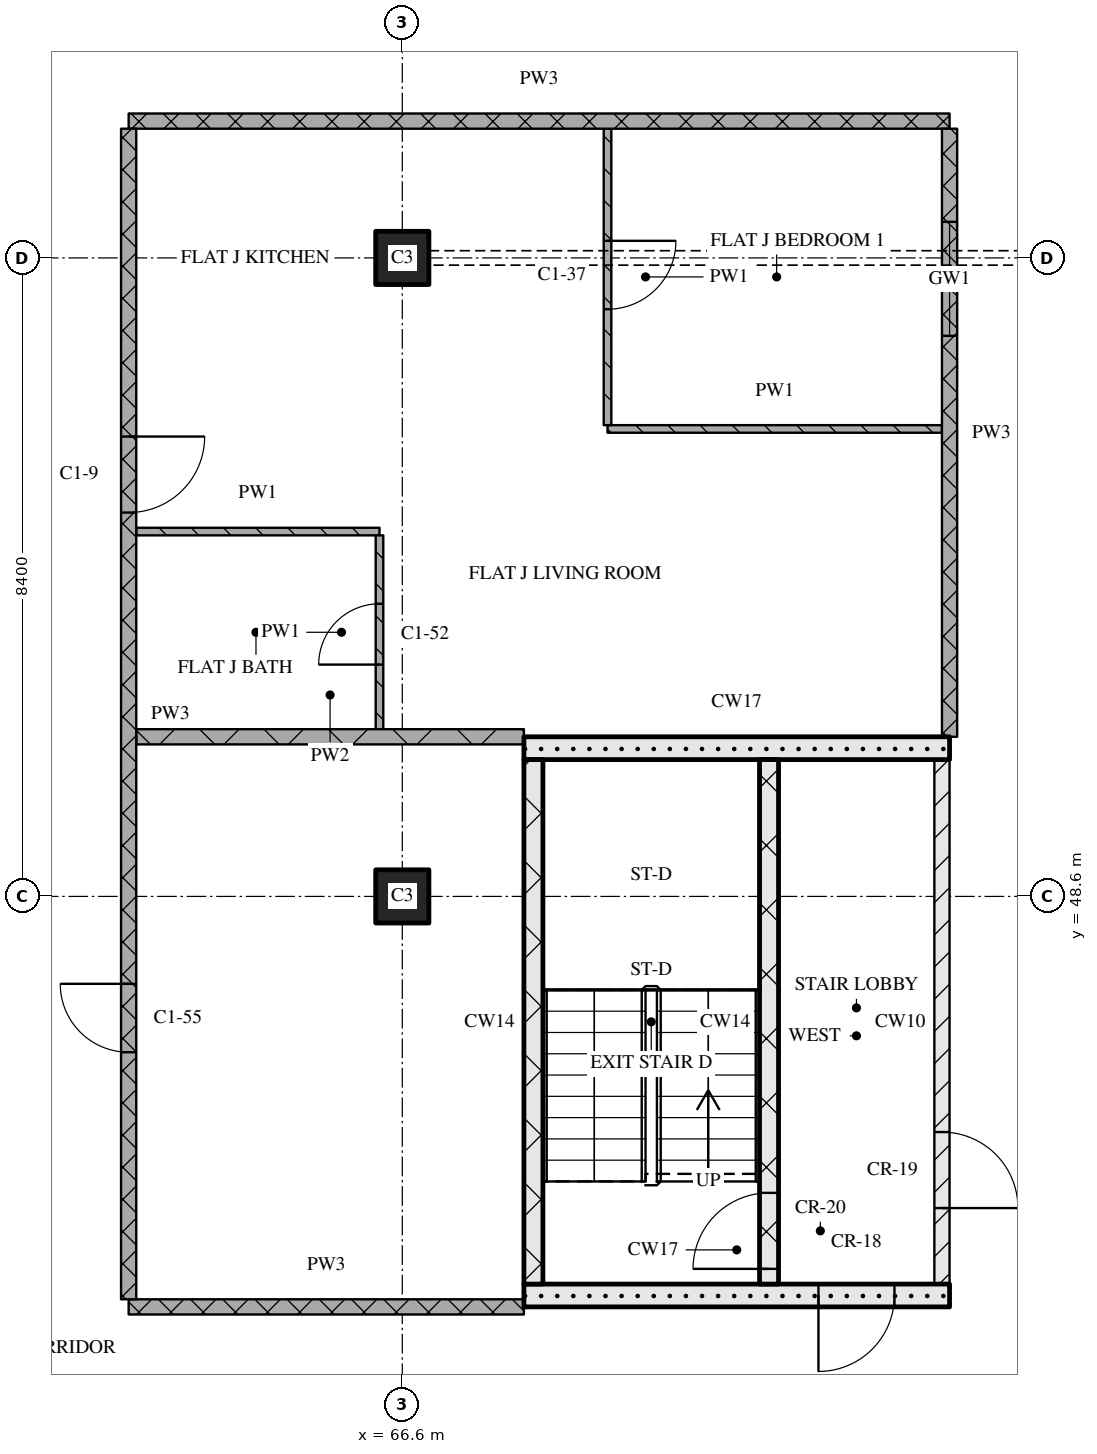
"""IFC4 building model, lengths in metres.
Left out: names, types, materials, properties, quantities, classifications, styles, units other than length and angle.
Written with IfcOpenShell. Run it as: python <this file> out.ifc"""

import sys

from ifc_helpers import new_model, si_unit, direction, frame, frame_2d, origin, origin_2d, place, context, subcontext, project, spatial, rectangle, extrude, element, fill, save


model = new_model("IFC4")
c1 = context("Model", 3, precision=1e-05, world=origin(), true_north=direction((0.0, 1.0)))
c2 = subcontext(c1, "Body", "Model", "MODEL_VIEW")
j1 = project(units=[si_unit("LENGTHUNIT", "METRE"), si_unit("PLANEANGLEUNIT", "RADIAN")], contexts=[c1])
p1 = place(None, origin())
s1 = spatial("IfcSite", under=j1, at=p1, CompositionType="ELEMENT")
p2 = place(p1, origin())
s2 = spatial("IfcBuilding", under=s1, at=p2, CompositionType="ELEMENT")
p3 = place(p2, frame((0.0, 0.0, 151.05)))
s3 = spatial("IfcBuildingStorey", under=s2, at=p3, CompositionType="ELEMENT", Elevation=151.05)
for number, where, z_axis, x_axis in (
    (1, (66.6, 48.6, 0.0), (0.0, 0.0, 1.0), (1.0, 0.0, 0.0)),
    (2, (66.6, 57.0, 0.0), (0.0, 0.0, 1.0), (1.0, 0.0, 0.0)),
):
    element("IfcColumn", number, at=place(p3, frame(where, z_axis=z_axis, x_axis=x_axis)), inside=s3, PredefinedType="COLUMN", context=c2, shape_type="SweptSolid", body=[
        extrude(rectangle(XDim=0.7, YDim=0.7, at=origin_2d()), origin(), (0.0, 0.0, 1.0), 3.6),
    ])
p4 = place(p3, frame((68.2, 43.35, 0.0), z_axis=(0.0, 0.0, 1.0), x_axis=(1.0, 0.0, 0.0)))
e3 = element("IfcWall", 3, at=p4, inside=s3, PredefinedType="SOLIDWALL", context=c2, shape_type="SweptSolid", body=[
    extrude(rectangle(XDim=5.6, YDim=0.3, at=frame_2d((2.8, 0.0))), origin(), (0.0, 0.0, 1.0), 3.32),
])
p5 = place(p4, frame((3.875, 0.0, 0.0)))
e4 = element("IfcOpeningElement", 4, at=p5, cuts=e3, PredefinedType="OPENING", context=c2, shape_type="SweptSolid", body=[
    extrude(rectangle(XDim=1.0, YDim=2.1, at=frame_2d((0.5, 1.05))), frame((0.0, 0.16, 0.0), z_axis=(0.0, -1.0, 0.0), x_axis=(1.0, 0.0, 0.0)), (0.0, 0.0, 1.0), 0.32),
])
p6 = place(p3, frame((68.325, 43.5, 0.0), z_axis=(0.0, 0.0, 1.0), x_axis=(0.0, 1.0, 0.0)))
e5 = element("IfcWall", 5, at=p6, inside=s3, PredefinedType="SOLIDWALL", context=c2, shape_type="SweptSolid", body=[
    extrude(rectangle(XDim=6.9, YDim=0.25, at=frame_2d((3.45, 0.0))), origin(), (0.0, 0.0, 1.0), 3.32),
])
p7 = place(p3, frame((71.425, 43.5, 0.0), z_axis=(0.0, 0.0, 1.0), x_axis=(0.0, 1.0, 0.0)))
e6 = element("IfcWall", 6, at=p7, inside=s3, PredefinedType="SOLIDWALL", context=c2, shape_type="SweptSolid", body=[
    extrude(rectangle(XDim=6.9, YDim=0.25, at=frame_2d((3.45, 0.0))), origin(), (0.0, 0.0, 1.0), 3.32),
])
p8 = place(p7, frame((0.2, 0.0, 0.0)))
e7 = element("IfcOpeningElement", 7, at=p8, cuts=e6, PredefinedType="OPENING", context=c2, shape_type="SweptSolid", body=[
    extrude(rectangle(XDim=1.0, YDim=2.1, at=frame_2d((0.5, 1.05))), frame((0.0, 0.135, 0.0), z_axis=(0.0, -1.0, 0.0), x_axis=(1.0, 0.0, 0.0)), (0.0, 0.0, 1.0), 0.27),
])
p9 = place(p3, frame((73.7, 43.5, 0.0), z_axis=(0.0, 0.0, 1.0), x_axis=(0.0, 1.0, 0.0)))
e8 = element("IfcWall", 8, at=p9, inside=s3, PredefinedType="PARTITIONING", context=c2, shape_type="SweptSolid", body=[
    extrude(rectangle(XDim=6.9, YDim=0.2, at=frame_2d((3.45, 0.0))), origin(), (0.0, 0.0, 1.0), 3.32),
])
p10 = place(p9, frame((1.0, 0.0, 0.0)))
e9 = element("IfcOpeningElement", 9, at=p10, cuts=e8, PredefinedType="OPENING", context=c2, shape_type="SweptSolid", body=[
    extrude(rectangle(XDim=1.0, YDim=2.1, at=frame_2d((0.5, 1.05))), frame((0.0, 0.11, 0.0), z_axis=(0.0, -1.0, 0.0), x_axis=(1.0, 0.0, 0.0)), (0.0, 0.0, 1.0), 0.22),
])
p11 = place(p3, frame((68.2, 50.55, 0.0), z_axis=(0.0, 0.0, 1.0), x_axis=(1.0, 0.0, 0.0)))
e10 = element("IfcWall", 10, at=p11, inside=s3, PredefinedType="SOLIDWALL", context=c2, shape_type="SweptSolid", body=[
    extrude(rectangle(XDim=5.6, YDim=0.3, at=frame_2d((2.8, 0.0))), origin(), (0.0, 0.0, 1.0), 3.32),
])
p12 = place(p3, frame((63.0, 43.2, 0.0), z_axis=(0.0, 0.0, 1.0), x_axis=(1.0, 0.0, 0.0)))
e11 = element("IfcWall", 11, at=p12, inside=s3, PredefinedType="PARTITIONING", context=c2, shape_type="SweptSolid", body=[
    extrude(rectangle(XDim=5.2, YDim=0.2, at=frame_2d((2.6, 0.0))), origin(), (0.0, 0.0, 1.0), 3.32),
])
p13 = place(p3, frame((63.1, 50.7, 0.0), z_axis=(0.0, 0.0, 1.0), x_axis=(1.0, 0.0, 0.0)))
e12 = element("IfcWall", 12, at=p13, inside=s3, PredefinedType="PARTITIONING", context=c2, shape_type="SweptSolid", body=[
    extrude(rectangle(XDim=5.1, YDim=0.2, at=frame_2d((2.55, 0.0))), origin(), (0.0, 0.0, 1.0), 3.32),
])
p14 = place(p3, frame((63.1, 53.4, 0.0), z_axis=(0.0, 0.0, 1.0), x_axis=(1.0, 0.0, 0.0)))
e13 = element("IfcWall", 13, at=p14, inside=s3, PredefinedType="PARTITIONING", context=c2, shape_type="SweptSolid", body=[
    extrude(rectangle(XDim=3.2, YDim=0.1, at=frame_2d((1.6, 0.0))), origin(), (0.0, 0.0, 1.0), 3.32),
])
p15 = place(p3, frame((69.3, 54.75, 0.0), z_axis=(0.0, 0.0, 1.0), x_axis=(1.0, 0.0, 0.0)))
e14 = element("IfcWall", 14, at=p15, inside=s3, PredefinedType="PARTITIONING", context=c2, shape_type="SweptSolid", body=[
    extrude(rectangle(XDim=4.4, YDim=0.1, at=frame_2d((2.2, 0.0))), origin(), (0.0, 0.0, 1.0), 3.32),
])
p16 = place(p3, frame((63.0, 58.8, 0.0), z_axis=(0.0, 0.0, 1.0), x_axis=(1.0, 0.0, 0.0)))
e15 = element("IfcWall", 15, at=p16, inside=s3, PredefinedType="PARTITIONING", context=c2, shape_type="SweptSolid", body=[
    extrude(rectangle(XDim=10.8, YDim=0.2, at=frame_2d((5.4, 0.0))), origin(), (0.0, 0.0, 1.0), 3.32),
])
p17 = place(p3, frame((63.0, 58.7, 0.0), z_axis=(0.0, 0.0, 1.0), x_axis=(0.0, -1.0, 0.0)))
e16 = element("IfcWall", 16, at=p17, inside=s3, PredefinedType="PARTITIONING", context=c2, shape_type="SweptSolid", body=[
    extrude(rectangle(XDim=15.4, YDim=0.2, at=frame_2d((7.7, 0.0))), origin(), (0.0, 0.0, 1.0), 3.32),
])
p18 = place(p17, frame((4.05, 0.0, 0.0)))
e17 = element("IfcOpeningElement", 17, at=p18, cuts=e16, PredefinedType="OPENING", context=c2, shape_type="SweptSolid", body=[
    extrude(rectangle(XDim=1.0, YDim=2.1, at=frame_2d((0.5, 1.05))), frame((0.0, 0.11, 0.0), z_axis=(0.0, -1.0, 0.0), x_axis=(1.0, 0.0, 0.0)), (0.0, 0.0, 1.0), 0.22),
])
p19 = place(p17, frame((11.25, 0.0, 0.0)))
e18 = element("IfcOpeningElement", 18, at=p19, cuts=e16, PredefinedType="OPENING", context=c2, shape_type="SweptSolid", body=[
    extrude(rectangle(XDim=0.9, YDim=2.1, at=frame_2d((0.45, 1.05))), frame((0.0, 0.11, 0.0), z_axis=(0.0, -1.0, 0.0), x_axis=(1.0, 0.0, 0.0)), (0.0, 0.0, 1.0), 0.22),
])
p20 = place(p3, frame((66.3, 50.8, 0.0), z_axis=(0.0, 0.0, 1.0), x_axis=(0.0, 1.0, 0.0)))
e19 = element("IfcWall", 19, at=p20, inside=s3, PredefinedType="PARTITIONING", context=c2, shape_type="SweptSolid", body=[
    extrude(rectangle(XDim=2.55, YDim=0.1, at=frame_2d((1.275, 0.0))), origin(), (0.0, 0.0, 1.0), 3.32),
])
p21 = place(p20, frame((0.85, 0.0, 0.0)))
e20 = element("IfcOpeningElement", 20, at=p21, cuts=e19, PredefinedType="OPENING", context=c2, shape_type="SweptSolid", body=[
    extrude(rectangle(XDim=0.8, YDim=2.1, at=frame_2d((0.4, 1.05))), frame((0.0, 0.06, 0.0), z_axis=(0.0, -1.0, 0.0), x_axis=(1.0, 0.0, 0.0)), (0.0, 0.0, 1.0), 0.12),
])
p22 = place(p3, frame((69.3, 58.7, 0.0), z_axis=(0.0, 0.0, 1.0), x_axis=(0.0, -1.0, 0.0)))
e21 = element("IfcWall", 21, at=p22, inside=s3, PredefinedType="PARTITIONING", context=c2, shape_type="SweptSolid", body=[
    extrude(rectangle(XDim=3.9, YDim=0.1, at=frame_2d((1.95, 0.0))), origin(), (0.0, 0.0, 1.0), 3.32),
])
p23 = place(p22, frame((1.475, 0.0, 0.0)))
e22 = element("IfcOpeningElement", 22, at=p23, cuts=e21, PredefinedType="OPENING", context=c2, shape_type="SweptSolid", body=[
    extrude(rectangle(XDim=0.9, YDim=2.1, at=frame_2d((0.45, 1.05))), frame((0.0, 0.06, 0.0), z_axis=(0.0, -1.0, 0.0), x_axis=(1.0, 0.0, 0.0)), (0.0, 0.0, 1.0), 0.12),
])
p24 = place(p3, frame((73.8, 58.7, 0.0), z_axis=(0.0, 0.0, 1.0), x_axis=(0.0, -1.0, 0.0)))
e23 = element("IfcWall", 23, at=p24, inside=s3, PredefinedType="PARTITIONING", context=c2, shape_type="SweptSolid", body=[
    extrude(rectangle(XDim=8.0, YDim=0.2, at=frame_2d((4.0, 0.0))), origin(), (0.0, 0.0, 1.0), 3.32),
])
p25 = place(p24, frame((1.225, 0.0, 0.9)))
e24 = element("IfcOpeningElement", 24, at=p25, cuts=e23, PredefinedType="OPENING", context=c2, shape_type="SweptSolid", body=[
    extrude(rectangle(XDim=1.5, YDim=1.5, at=frame_2d((0.75, 0.75))), frame((0.0, 0.11, 0.0), z_axis=(0.0, -1.0, 0.0), x_axis=(1.0, 0.0, 0.0)), (0.0, 0.0, 1.0), 0.22),
])
p26 = place(p5, origin())
e25 = element("IfcDoor", 25, at=p26, inside=s3, OperationType="SINGLE_SWING_RIGHT", PredefinedType="DOOR", context=c2, shape_type="SweptSolid", body=[
    extrude(rectangle(XDim=1.0, YDim=2.1, at=frame_2d((0.5, 1.05))), frame((0.0, 0.025, 0.0), z_axis=(0.0, -1.0, 0.0), x_axis=(1.0, 0.0, 0.0)), (0.0, 0.0, 1.0), 0.05),
])
fill(e4, e25)
p27 = place(p8, origin())
e26 = element("IfcDoor", 26, at=p27, inside=s3, OperationType="SINGLE_SWING_LEFT", PredefinedType="DOOR", context=c2, shape_type="SweptSolid", body=[
    extrude(rectangle(XDim=1.0, YDim=2.1, at=frame_2d((0.5, 1.05))), frame((0.0, 0.025, 0.0), z_axis=(0.0, -1.0, 0.0), x_axis=(1.0, 0.0, 0.0)), (0.0, 0.0, 1.0), 0.05),
])
fill(e7, e26)
p28 = place(p10, origin())
e27 = element("IfcDoor", 27, at=p28, inside=s3, OperationType="SINGLE_SWING_RIGHT", PredefinedType="DOOR", context=c2, shape_type="SweptSolid", body=[
    extrude(rectangle(XDim=1.0, YDim=2.1, at=frame_2d((0.5, 1.05))), frame((0.0, 0.025, 0.0), z_axis=(0.0, -1.0, 0.0), x_axis=(1.0, 0.0, 0.0)), (0.0, 0.0, 1.0), 0.05),
])
fill(e9, e27)
p29 = place(p18, origin())
e28 = element("IfcDoor", 28, at=p29, inside=s3, OperationType="SINGLE_SWING_LEFT", PredefinedType="DOOR", context=c2, shape_type="SweptSolid", body=[
    extrude(rectangle(XDim=1.0, YDim=2.1, at=frame_2d((0.5, 1.05))), frame((0.0, 0.025, 0.0), z_axis=(0.0, -1.0, 0.0), x_axis=(1.0, 0.0, 0.0)), (0.0, 0.0, 1.0), 0.05),
])
fill(e17, e28)
p30 = place(p19, origin())
e29 = element("IfcDoor", 29, at=p30, inside=s3, OperationType="SINGLE_SWING_RIGHT", PredefinedType="DOOR", context=c2, shape_type="SweptSolid", body=[
    extrude(rectangle(XDim=0.9, YDim=2.1, at=frame_2d((0.45, 1.05))), frame((0.0, 0.025, 0.0), z_axis=(0.0, -1.0, 0.0), x_axis=(1.0, 0.0, 0.0)), (0.0, 0.0, 1.0), 0.05),
])
fill(e18, e29)
p31 = place(p21, origin())
e30 = element("IfcDoor", 30, at=p31, inside=s3, OperationType="SINGLE_SWING_LEFT", PredefinedType="DOOR", context=c2, shape_type="SweptSolid", body=[
    extrude(rectangle(XDim=0.8, YDim=2.1, at=frame_2d((0.4, 1.05))), frame((0.0, 0.025, 0.0), z_axis=(0.0, -1.0, 0.0), x_axis=(1.0, 0.0, 0.0)), (0.0, 0.0, 1.0), 0.05),
])
fill(e20, e30)
p32 = place(p23, origin())
e31 = element("IfcDoor", 31, at=p32, inside=s3, OperationType="SINGLE_SWING_LEFT", PredefinedType="DOOR", context=c2, shape_type="SweptSolid", body=[
    extrude(rectangle(XDim=0.9, YDim=2.1, at=frame_2d((0.45, 1.05))), frame((0.0, 0.025, 0.0), z_axis=(0.0, -1.0, 0.0), x_axis=(1.0, 0.0, 0.0)), (0.0, 0.0, 1.0), 0.05),
])
fill(e22, e31)
p33 = place(p25, origin())
e32 = element("IfcWindow", 32, at=p33, inside=s3, PartitioningType="SINGLE_PANEL", PredefinedType="WINDOW", context=c2, shape_type="SweptSolid", body=[
    extrude(rectangle(XDim=1.5, YDim=1.5, at=frame_2d((0.75, 0.75))), frame((0.0, 0.03, 0.0), z_axis=(0.0, -1.0, 0.0), x_axis=(1.0, 0.0, 0.0)), (0.0, 0.0, 1.0), 0.06),
])
fill(e24, e32)
save(model, sys.argv[1])
